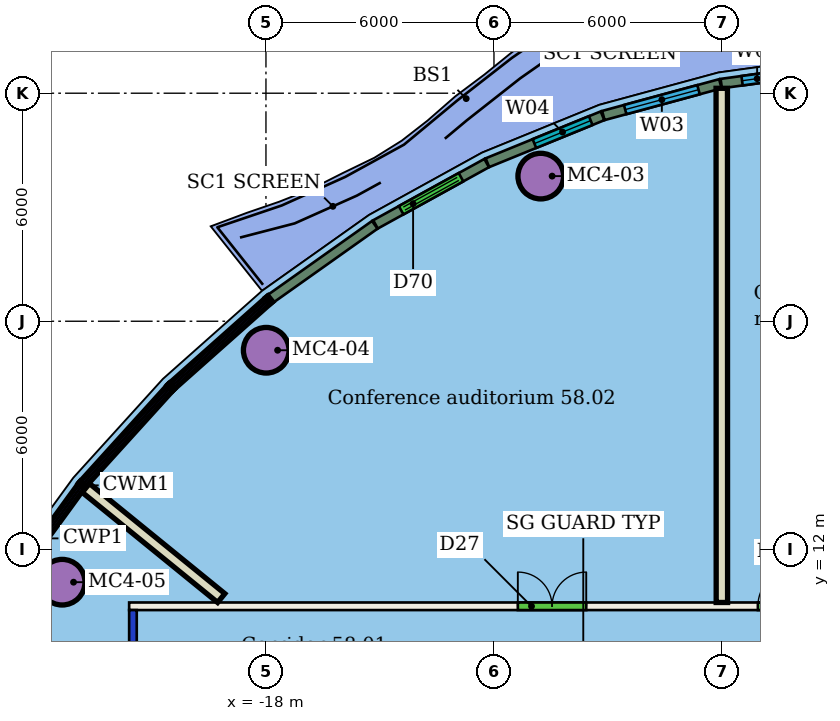
"""IFC4 building model, lengths in metres.
Left out: names, types, materials, properties, quantities, classifications, styles, units other than length and angle.
Written with IfcOpenShell. Run it as: python <this file> out.ifc"""

import sys

from ifc_helpers import new_model, si_unit, direction, frame, frame_2d, origin, origin_2d, place, context, subcontext, project, spatial, rectangle, hollow_circle, extrude, element, fill, save


model = new_model("IFC4")
c1 = context("Model", 3, precision=1e-05, world=origin(), true_north=direction((0.0, 1.0)))
c2 = subcontext(c1, "Body", "Model", "MODEL_VIEW")
j1 = project(units=[si_unit("LENGTHUNIT", "METRE"), si_unit("PLANEANGLEUNIT", "RADIAN")], contexts=[c1])
p1 = place(None, origin())
s1 = spatial("IfcSite", under=j1, at=p1, CompositionType="ELEMENT")
p2 = place(p1, origin())
s2 = spatial("IfcBuilding", under=s1, at=p2, CompositionType="ELEMENT")
p3 = place(p2, frame((0.0, 0.0, 235.3)))
s3 = spatial("IfcBuildingStorey", under=s2, at=p3, CompositionType="ELEMENT", Elevation=235.3)
for number, where, z_axis, x_axis in (
    (1, (-10.769, 21.819, 0.0), (0.0, 0.0, 1.0), (1.0, 0.0, 0.0)),
    (2, (-17.993, 17.237, 0.0), (0.0, 0.0, 1.0), (1.0, 0.0, 0.0)),
    (3, (-23.363, 11.134, 0.0), (0.0, 0.0, 1.0), (1.0, 0.0, 0.0)),
):
    element("IfcColumn", number, at=place(p3, frame(where, z_axis=z_axis, x_axis=x_axis)), inside=s3, PredefinedType="COLUMN", context=c2, shape_type="SweptSolid", body=[
        extrude(hollow_circle(Radius=0.6, WallThickness=0.045, at=origin_2d()), origin(), (0.0, 0.0, 1.0), 3.45),
    ])
p4 = place(p3, frame((-21.5, -10.4, 0.0), z_axis=(0.0, 0.0, 1.0), x_axis=(0.0, 1.0, 0.0)))
e4 = element("IfcWall", 4, at=p4, inside=s3, PredefinedType="PARTITIONING", context=c2, shape_type="SweptSolid", body=[
    extrude(rectangle(XDim=20.8, YDim=0.2, at=frame_2d((10.4, 0.0))), origin(), (0.0, 0.0, 1.0), 3.05),
])
p5 = place(p4, frame((14.14, 0.0, 0.0)))
e5 = element("IfcOpeningElement", 5, at=p5, cuts=e4, PredefinedType="OPENING", context=c2, shape_type="SweptSolid", body=[
    extrude(rectangle(XDim=1.2, YDim=2.4, at=frame_2d((0.6, 1.2))), frame((0.0, 0.11, 0.0), z_axis=(0.0, -1.0, 0.0), x_axis=(1.0, 0.0, 0.0)), (0.0, 0.0, 1.0), 0.22),
])
p6 = place(p4, frame((6.51, 0.0, 0.0)))
e6 = element("IfcOpeningElement", 6, at=p6, cuts=e4, PredefinedType="OPENING", context=c2, shape_type="SweptSolid", body=[
    extrude(rectangle(XDim=1.8, YDim=2.4, at=frame_2d((0.9, 1.2))), frame((0.0, 0.11, 0.0), z_axis=(0.0, -1.0, 0.0), x_axis=(1.0, 0.0, 0.0)), (0.0, 0.0, 1.0), 0.22),
])
p7 = place(p3, frame((-21.6, 10.5, 0.0), z_axis=(0.0, 0.0, 1.0), x_axis=(1.0, 0.0, 0.0)))
e7 = element("IfcWall", 7, at=p7, inside=s3, PredefinedType="PARTITIONING", context=c2, shape_type="SweptSolid", body=[
    extrude(rectangle(XDim=31.2, YDim=0.2, at=frame_2d((15.6, 0.0))), origin(), (0.0, 0.0, 1.0), 3.45),
])
p8 = place(p7, frame((16.544, 0.0, 0.0)))
e8 = element("IfcOpeningElement", 8, at=p8, cuts=e7, PredefinedType="OPENING", context=c2, shape_type="SweptSolid", body=[
    extrude(rectangle(XDim=1.0, YDim=2.4, at=frame_2d((0.5, 1.2))), frame((0.0, 0.11, 0.0), z_axis=(0.0, -1.0, 0.0), x_axis=(1.0, 0.0, 0.0)), (0.0, 0.0, 1.0), 0.22),
])
p9 = place(p7, frame((10.228, 0.0, 0.0)))
e9 = element("IfcOpeningElement", 9, at=p9, cuts=e7, PredefinedType="OPENING", context=c2, shape_type="SweptSolid", body=[
    extrude(rectangle(XDim=1.8, YDim=2.4, at=frame_2d((0.9, 1.2))), frame((0.0, 0.11, 0.0), z_axis=(0.0, -1.0, 0.0), x_axis=(1.0, 0.0, 0.0)), (0.0, 0.0, 1.0), 0.22),
])
p10 = place(p7, frame((21.755, 0.0, 0.0)))
e10 = element("IfcOpeningElement", 10, at=p10, cuts=e7, PredefinedType="OPENING", context=c2, shape_type="SweptSolid", body=[
    extrude(rectangle(XDim=1.8, YDim=2.4, at=frame_2d((0.9, 1.2))), frame((0.0, 0.11, 0.0), z_axis=(0.0, -1.0, 0.0), x_axis=(1.0, 0.0, 0.0)), (0.0, 0.0, 1.0), 0.22),
])
p11 = place(p3, frame((-6.006, 24.129, 0.0), z_axis=(0.0, 0.0, 1.0), x_axis=(0.000252643728, -0.999999968086, 0.0)))
e11 = element("IfcWall", 11, at=p11, inside=s3, PredefinedType="PARTITIONING", context=c2, shape_type="SweptSolid", body=[
    extrude(rectangle(XDim=13.529, YDim=0.3, at=frame_2d((6.764, 0.0))), origin(), (0.0, 0.0, 1.0), 3.45),
])
p12 = place(p3, frame((-22.74, 13.614, 0.0), z_axis=(0.0, 0.0, 1.0), x_axis=(0.775822828674, -0.63095082099, 0.0)))
e12 = element("IfcWall", 12, at=p12, inside=s3, PredefinedType="PARTITIONING", context=c2, shape_type="SweptSolid", body=[
    extrude(rectangle(XDim=4.592, YDim=0.3, at=frame_2d((2.296, 0.0))), origin(), (0.0, 0.0, 1.0), 3.45),
])
p13 = place(p3, frame((-2.943, 24.676, 0.0), z_axis=(0.0, 0.0, 1.0), x_axis=(-0.990694748904, -0.136102588123, 0.0)))
e13 = element("IfcWall", 13, at=p13, inside=s3, PredefinedType="SOLIDWALL", context=c2, shape_type="SweptSolid", body=[
    extrude(rectangle(XDim=3.105, YDim=0.25, at=frame_2d((1.552, 0.0))), origin(), (0.0, 0.0, 1.0), 3.1),
])
p14 = place(p13, frame((0.553, 0.0, 0.9)))
e14 = element("IfcOpeningElement", 14, at=p14, cuts=e13, PredefinedType="OPENING", context=c2, shape_type="SweptSolid", body=[
    extrude(rectangle(XDim=2.0, YDim=2.1, at=frame_2d((1.0, 1.05))), frame((0.0, 0.135, 0.0), z_axis=(0.0, -1.0, 0.0), x_axis=(1.0, 0.0, 0.0)), (0.0, 0.0, 1.0), 0.27),
])
p15 = place(p3, frame((-6.043, 24.248, 0.0), z_axis=(0.0, 0.0, 1.0), x_axis=(-0.965105590166, -0.261861031522, 0.0)))
e15 = element("IfcWall", 15, at=p15, inside=s3, PredefinedType="SOLIDWALL", context=c2, shape_type="SweptSolid", body=[
    extrude(rectangle(XDim=3.19, YDim=0.25, at=frame_2d((1.595, 0.0))), origin(), (0.0, 0.0, 1.0), 3.1),
])
p16 = place(p15, frame((0.595, 0.0, 0.9)))
e16 = element("IfcOpeningElement", 16, at=p16, cuts=e15, PredefinedType="OPENING", context=c2, shape_type="SweptSolid", body=[
    extrude(rectangle(XDim=2.0, YDim=2.1, at=frame_2d((1.0, 1.05))), frame((0.0, 0.135, 0.0), z_axis=(0.0, -1.0, 0.0), x_axis=(1.0, 0.0, 0.0)), (0.0, 0.0, 1.0), 0.27),
])
p17 = place(p3, frame((-9.144, 23.406, 0.0), z_axis=(0.0, 0.0, 1.0), x_axis=(-0.926011191342, -0.377496057607, 0.0)))
e17 = element("IfcWall", 17, at=p17, inside=s3, PredefinedType="SOLIDWALL", context=c2, shape_type="SweptSolid", body=[
    extrude(rectangle(XDim=3.271, YDim=0.25, at=frame_2d((1.635, 0.0))), origin(), (0.0, 0.0, 1.0), 3.1),
])
p18 = place(p17, frame((0.335, 0.0, 0.9)))
e18 = element("IfcOpeningElement", 18, at=p18, cuts=e17, PredefinedType="OPENING", context=c2, shape_type="SweptSolid", body=[
    extrude(rectangle(XDim=1.6, YDim=2.1, at=frame_2d((0.8, 1.05))), frame((0.0, 0.135, 0.0), z_axis=(0.0, -1.0, 0.0), x_axis=(1.0, 0.0, 0.0)), (0.0, 0.0, 1.0), 0.27),
])
p19 = place(p3, frame((-12.193, 22.161, 0.0), z_axis=(0.0, 0.0, 1.0), x_axis=(-0.875645897976, -0.482953684486, 0.0)))
e19 = element("IfcWall", 19, at=p19, inside=s3, PredefinedType="SOLIDWALL", context=c2, shape_type="SweptSolid", body=[
    extrude(rectangle(XDim=3.34, YDim=0.25, at=frame_2d((1.67, 0.0))), origin(), (0.0, 0.0, 1.0), 3.1),
])
p20 = place(p19, frame((0.77, 0.0, 0.0)))
e20 = element("IfcOpeningElement", 20, at=p20, cuts=e19, PredefinedType="OPENING", context=c2, shape_type="SweptSolid", body=[
    extrude(rectangle(XDim=1.8, YDim=2.4, at=frame_2d((0.9, 1.2))), frame((0.0, 0.135, 0.0), z_axis=(0.0, -1.0, 0.0), x_axis=(1.0, 0.0, 0.0)), (0.0, 0.0, 1.0), 0.27),
])
p21 = place(p3, frame((-15.137, 20.536, 0.0), z_axis=(0.0, 0.0, 1.0), x_axis=(-0.81577537226, -0.578368863282, 0.0)))
e21 = element("IfcWall", 21, at=p21, inside=s3, PredefinedType="SOLIDWALL", context=c2, shape_type="SweptSolid", body=[
    extrude(rectangle(XDim=3.353, YDim=0.25, at=frame_2d((1.676, 0.0))), origin(), (0.0, 0.0, 1.0), 3.1),
])
p22 = place(p8, origin())
e22 = element("IfcDoor", 22, at=p22, inside=s3, OperationType="SINGLE_SWING_RIGHT", PredefinedType="DOOR", context=c2, shape_type="SweptSolid", body=[
    extrude(rectangle(XDim=1.0, YDim=2.4, at=frame_2d((0.5, 1.2))), frame((0.0, 0.025, 0.0), z_axis=(0.0, -1.0, 0.0), x_axis=(1.0, 0.0, 0.0)), (0.0, 0.0, 1.0), 0.05),
])
fill(e8, e22)
p23 = place(p9, origin())
e23 = element("IfcDoor", 23, at=p23, inside=s3, OperationType="DOUBLE_DOOR_SINGLE_SWING", PredefinedType="DOOR", context=c2, shape_type="SweptSolid", body=[
    extrude(rectangle(XDim=1.8, YDim=2.4, at=frame_2d((0.9, 1.2))), frame((0.0, 0.025, 0.0), z_axis=(0.0, -1.0, 0.0), x_axis=(1.0, 0.0, 0.0)), (0.0, 0.0, 1.0), 0.05),
])
fill(e9, e23)
p24 = place(p14, origin())
e24 = element("IfcWindow", 24, at=p24, inside=s3, PartitioningType="SINGLE_PANEL", PredefinedType="WINDOW", context=c2, shape_type="SweptSolid", body=[
    extrude(rectangle(XDim=2.0, YDim=2.1, at=frame_2d((1.0, 1.05))), frame((0.0, 0.03, 0.0), z_axis=(0.0, -1.0, 0.0), x_axis=(1.0, 0.0, 0.0)), (0.0, 0.0, 1.0), 0.06),
])
fill(e14, e24)
p25 = place(p16, origin())
e25 = element("IfcWindow", 25, at=p25, inside=s3, PartitioningType="SINGLE_PANEL", PredefinedType="WINDOW", context=c2, shape_type="SweptSolid", body=[
    extrude(rectangle(XDim=2.0, YDim=2.1, at=frame_2d((1.0, 1.05))), frame((0.0, 0.03, 0.0), z_axis=(0.0, -1.0, 0.0), x_axis=(1.0, 0.0, 0.0)), (0.0, 0.0, 1.0), 0.06),
])
fill(e16, e25)
p26 = place(p18, origin())
e26 = element("IfcWindow", 26, at=p26, inside=s3, PartitioningType="SINGLE_PANEL", PredefinedType="WINDOW", context=c2, shape_type="SweptSolid", body=[
    extrude(rectangle(XDim=1.6, YDim=2.1, at=frame_2d((0.8, 1.05))), frame((0.0, 0.03, 0.0), z_axis=(0.0, -1.0, 0.0), x_axis=(1.0, 0.0, 0.0)), (0.0, 0.0, 1.0), 0.06),
])
fill(e18, e26)
p27 = place(p20, origin())
e27 = element("IfcDoor", 27, at=p27, inside=s3, OperationType="DOUBLE_DOOR_SLIDING", PredefinedType="DOOR", context=c2, shape_type="SweptSolid", body=[
    extrude(rectangle(XDim=1.8, YDim=2.4, at=frame_2d((0.9, 1.2))), frame((0.0, 0.025, 0.0), z_axis=(0.0, -1.0, 0.0), x_axis=(1.0, 0.0, 0.0)), (0.0, 0.0, 1.0), 0.05),
])
fill(e20, e27)
save(model, sys.argv[1])
